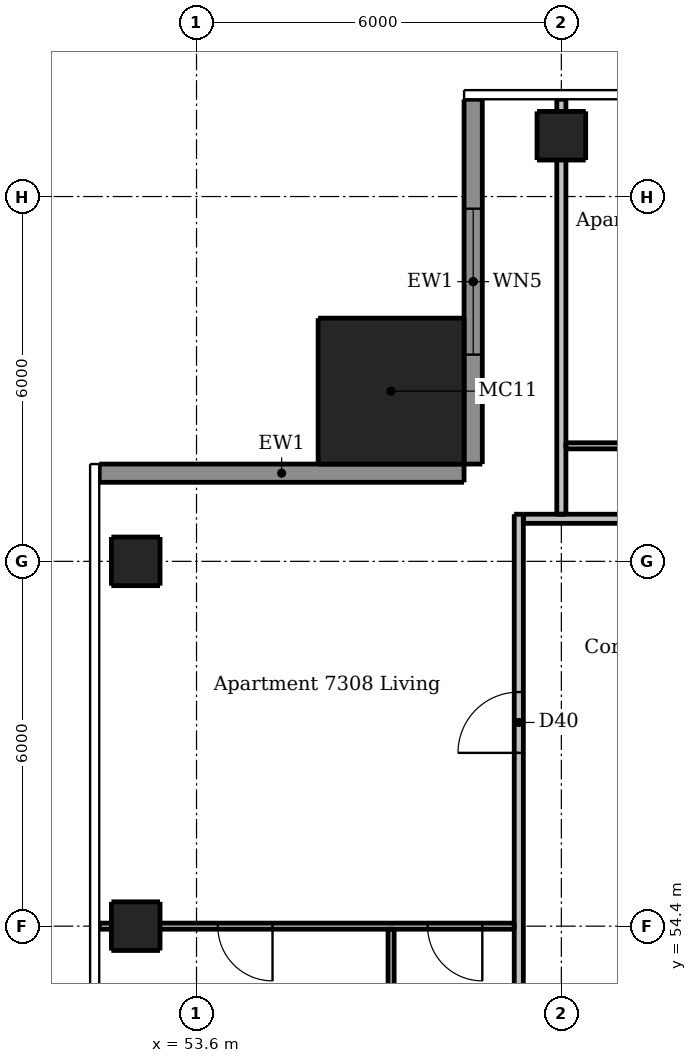
"""IFC4 building model, lengths in metres.
Left out: names, types, materials, properties, quantities, classifications, styles, units other than length and angle.
Written with IfcOpenShell. Run it as: python <this file> out.ifc"""

import sys

from ifc_helpers import new_model, si_unit, direction, frame, frame_2d, origin, origin_2d, place, context, subcontext, project, spatial, rectangle, extrude, element, fill, save


model = new_model("IFC4")
c1 = context("Model", 3, precision=1e-05, world=origin(), true_north=direction((0.0, 1.0)))
c2 = subcontext(c1, "Body", "Model", "MODEL_VIEW")
j1 = project(units=[si_unit("LENGTHUNIT", "METRE"), si_unit("PLANEANGLEUNIT", "RADIAN")], contexts=[c1])
p1 = place(None, origin())
s1 = spatial("IfcSite", under=j1, at=p1, CompositionType="ELEMENT")
p2 = place(p1, origin())
s2 = spatial("IfcBuilding", under=s1, at=p2, CompositionType="ELEMENT")
p3 = place(p2, frame((0.0, 0.0, 271.9)))
s3 = spatial("IfcBuildingStorey", under=s2, at=p3, CompositionType="ELEMENT", Elevation=271.9)
for number, where, z_axis, x_axis in (
    (1, (59.6, 67.4, 0.0), (0.0, 0.0, 1.0), (1.0, 0.0, 0.0)),
    (2, (52.6, 54.4, 0.0), (0.0, 0.0, 1.0), (1.0, 0.0, 0.0)),
    (3, (52.6, 60.4, 0.0), (0.0, 0.0, 1.0), (1.0, 0.0, 0.0)),
):
    element("IfcColumn", number, at=place(p3, frame(where, z_axis=z_axis, x_axis=x_axis)), inside=s3, PredefinedType="COLUMN", context=c2, shape_type="SweptSolid", body=[
        extrude(rectangle(XDim=0.8, YDim=0.8, at=origin_2d()), origin(), (0.0, 0.0, 1.0), 3.05),
    ])
p4 = place(p3, frame((56.8, 63.2, 0.0), z_axis=(0.0, 0.0, 1.0), x_axis=(1.0, 0.0, 0.0)))
e4 = element("IfcColumn", 4, at=p4, inside=s3, PredefinedType="COLUMN", context=c2, shape_type="SweptSolid", body=[
    extrude(rectangle(XDim=2.4, YDim=2.4, at=origin_2d()), origin(), (0.0, 0.0, 1.0), 3.3),
])
p5 = place(p3, frame((58.15, 68.0, 0.0), z_axis=(0.0, 0.0, 1.0), x_axis=(0.0, -1.0, 0.0)))
e5 = element("IfcWall", 5, at=p5, inside=s3, PredefinedType="SOLIDWALL", context=c2, shape_type="SweptSolid", body=[
    extrude(rectangle(XDim=6.0, YDim=0.3, at=frame_2d((3.0, 0.0))), origin(), (0.0, 0.0, 1.0), 3.05),
])
p6 = place(p5, frame((1.8, 0.0, 0.15)))
e6 = element("IfcOpeningElement", 6, at=p6, cuts=e5, PredefinedType="OPENING", context=c2, shape_type="SweptSolid", body=[
    extrude(rectangle(XDim=2.4, YDim=2.1, at=frame_2d((1.2, 1.05))), frame((0.0, 0.16, 0.0), z_axis=(0.0, -1.0, 0.0), x_axis=(1.0, 0.0, 0.0)), (0.0, 0.0, 1.0), 0.32),
])
p7 = place(p3, frame((58.0, 61.85, 0.0), z_axis=(0.0, 0.0, 1.0), x_axis=(-1.0, 0.0, 0.0)))
e7 = element("IfcWall", 7, at=p7, inside=s3, PredefinedType="SOLIDWALL", context=c2, shape_type="SweptSolid", body=[
    extrude(rectangle(XDim=6.0, YDim=0.3, at=frame_2d((3.0, 0.0))), origin(), (0.0, 0.0, 1.0), 3.05),
])
p8 = place(p3, frame((56.8, 54.35, 0.0), z_axis=(0.0, 0.0, 1.0), x_axis=(0.0, -1.0, 0.0)))
e8 = element("IfcWall", 8, at=p8, inside=s3, PredefinedType="PARTITIONING", context=c2, shape_type="SweptSolid", body=[
    extrude(rectangle(XDim=5.875, YDim=0.1, at=frame_2d((2.938, 0.0))), origin(), (0.0, 0.0, 1.0), 3.05),
])
p9 = place(p8, frame((3.75, 0.0, 0.0)))
e9 = element("IfcOpeningElement", 9, at=p9, cuts=e8, PredefinedType="OPENING", context=c2, shape_type="SweptSolid", body=[
    extrude(rectangle(XDim=0.8, YDim=2.1, at=frame_2d((0.4, 1.05))), frame((0.0, 0.06, 0.0), z_axis=(0.0, -1.0, 0.0), x_axis=(1.0, 0.0, 0.0)), (0.0, 0.0, 1.0), 0.12),
])
p10 = place(p3, frame((59.675, 62.3, 0.0), z_axis=(0.0, 0.0, 1.0), x_axis=(1.0, 0.0, 0.0)))
e10 = element("IfcWall", 10, at=p10, inside=s3, PredefinedType="PARTITIONING", context=c2, shape_type="SweptSolid", body=[
    extrude(rectangle(XDim=17.85, YDim=0.1, at=frame_2d((8.925, 0.0))), origin(), (0.0, 0.0, 1.0), 3.05),
])
p11 = place(p10, frame((9.975, 0.0, 0.0)))
e11 = element("IfcOpeningElement", 11, at=p11, cuts=e10, PredefinedType="OPENING", context=c2, shape_type="SweptSolid", body=[
    extrude(rectangle(XDim=0.9, YDim=2.1, at=frame_2d((0.45, 1.05))), frame((0.0, 0.06, 0.0), z_axis=(0.0, -1.0, 0.0), x_axis=(1.0, 0.0, 0.0)), (0.0, 0.0, 1.0), 0.12),
])
p12 = place(p10, frame((15.975, 0.0, 0.0)))
e12 = element("IfcOpeningElement", 12, at=p12, cuts=e10, PredefinedType="OPENING", context=c2, shape_type="SweptSolid", body=[
    extrude(rectangle(XDim=0.9, YDim=2.1, at=frame_2d((0.45, 1.05))), frame((0.0, 0.06, 0.0), z_axis=(0.0, -1.0, 0.0), x_axis=(1.0, 0.0, 0.0)), (0.0, 0.0, 1.0), 0.12),
])
p13 = place(p10, frame((13.575, 0.0, 0.0)))
e13 = element("IfcOpeningElement", 13, at=p13, cuts=e10, PredefinedType="OPENING", context=c2, shape_type="SweptSolid", body=[
    extrude(rectangle(XDim=0.9, YDim=2.1, at=frame_2d((0.45, 1.05))), frame((0.0, 0.06, 0.0), z_axis=(0.0, -1.0, 0.0), x_axis=(1.0, 0.0, 0.0)), (0.0, 0.0, 1.0), 0.12),
])
p14 = place(p10, frame((6.375, 0.0, 0.0)))
e14 = element("IfcOpeningElement", 14, at=p14, cuts=e10, PredefinedType="OPENING", context=c2, shape_type="SweptSolid", body=[
    extrude(rectangle(XDim=0.9, YDim=2.1, at=frame_2d((0.45, 1.05))), frame((0.0, 0.06, 0.0), z_axis=(0.0, -1.0, 0.0), x_axis=(1.0, 0.0, 0.0)), (0.0, 0.0, 1.0), 0.12),
])
p15 = place(p10, frame((1.275, 0.0, 0.0)))
e15 = element("IfcOpeningElement", 15, at=p15, cuts=e10, PredefinedType="OPENING", context=c2, shape_type="SweptSolid", body=[
    extrude(rectangle(XDim=0.9, YDim=2.1, at=frame_2d((0.45, 1.05))), frame((0.0, 0.06, 0.0), z_axis=(0.0, -1.0, 0.0), x_axis=(1.0, 0.0, 0.0)), (0.0, 0.0, 1.0), 0.12),
])
p16 = place(p10, frame((4.325, 0.0, 0.0)))
e16 = element("IfcOpeningElement", 16, at=p16, cuts=e10, PredefinedType="OPENING", context=c2, shape_type="SweptSolid", body=[
    extrude(rectangle(XDim=0.8, YDim=2.1, at=frame_2d((0.4, 1.05))), frame((0.0, 0.06, 0.0), z_axis=(0.0, -1.0, 0.0), x_axis=(1.0, 0.0, 0.0)), (0.0, 0.0, 1.0), 0.12),
])
p17 = place(p3, frame((58.825, 54.4, 0.0), z_axis=(0.0, 0.0, 1.0), x_axis=(-1.0, 0.0, 0.0)))
e17 = element("IfcWall", 17, at=p17, inside=s3, PredefinedType="PARTITIONING", context=c2, shape_type="SweptSolid", body=[
    extrude(rectangle(XDim=6.825, YDim=0.1, at=frame_2d((3.413, 0.0))), origin(), (0.0, 0.0, 1.0), 2.516),
])
p18 = place(p17, frame((0.525, 0.0, 0.0)))
e18 = element("IfcOpeningElement", 18, at=p18, cuts=e17, PredefinedType="OPENING", context=c2, shape_type="SweptSolid", body=[
    extrude(rectangle(XDim=0.9, YDim=2.1, at=frame_2d((0.45, 1.05))), frame((0.0, 0.06, 0.0), z_axis=(0.0, -1.0, 0.0), x_axis=(1.0, 0.0, 0.0)), (0.0, 0.0, 1.0), 0.12),
])
p19 = place(p17, frame((3.975, 0.0, 0.0)))
e19 = element("IfcOpeningElement", 19, at=p19, cuts=e17, PredefinedType="OPENING", context=c2, shape_type="SweptSolid", body=[
    extrude(rectangle(XDim=0.9, YDim=2.1, at=frame_2d((0.45, 1.05))), frame((0.0, 0.06, 0.0), z_axis=(0.0, -1.0, 0.0), x_axis=(1.0, 0.0, 0.0)), (0.0, 0.0, 1.0), 0.12),
])
p20 = place(p3, frame((58.9, 30.325, 0.0), z_axis=(0.0, 0.0, 1.0), x_axis=(0.0, 1.0, 0.0)))
e20 = element("IfcWall", 20, at=p20, inside=s3, PredefinedType="PARTITIONING", context=c2, shape_type="SweptSolid", body=[
    extrude(rectangle(XDim=30.85, YDim=0.15, at=frame_2d((15.425, 0.0))), origin(), (0.0, 0.0, 1.0), 3.05),
])
p21 = place(p20, frame((9.225, 0.0, 0.0)))
e21 = element("IfcOpeningElement", 21, at=p21, cuts=e20, PredefinedType="OPENING", context=c2, shape_type="SweptSolid", body=[
    extrude(rectangle(XDim=1.0, YDim=2.1, at=frame_2d((0.5, 1.05))), frame((0.0, 0.085, 0.0), z_axis=(0.0, -1.0, 0.0), x_axis=(1.0, 0.0, 0.0)), (0.0, 0.0, 1.0), 0.17),
])
p22 = place(p20, frame((26.925, 0.0, 0.0)))
e22 = element("IfcOpeningElement", 22, at=p22, cuts=e20, PredefinedType="OPENING", context=c2, shape_type="SweptSolid", body=[
    extrude(rectangle(XDim=1.0, YDim=2.1, at=frame_2d((0.5, 1.05))), frame((0.0, 0.085, 0.0), z_axis=(0.0, -1.0, 0.0), x_axis=(1.0, 0.0, 0.0)), (0.0, 0.0, 1.0), 0.17),
])
p23 = place(p3, frame((59.6, 61.175, 0.0), z_axis=(0.0, 0.0, 1.0), x_axis=(0.0, 1.0, 0.0)))
e23 = element("IfcWall", 23, at=p23, inside=s3, PredefinedType="PARTITIONING", context=c2, shape_type="SweptSolid", body=[
    extrude(rectangle(XDim=6.825, YDim=0.15, at=frame_2d((3.413, 0.0))), origin(), (0.0, 0.0, 1.0), 2.51),
])
p24 = place(p3, frame((58.975, 61.1, 0.0), z_axis=(0.0, 0.0, 1.0), x_axis=(1.0, 0.0, 0.0)))
e24 = element("IfcWall", 24, at=p24, inside=s3, PredefinedType="PARTITIONING", context=c2, shape_type="SweptSolid", body=[
    extrude(rectangle(XDim=29.25, YDim=0.15, at=frame_2d((14.625, 0.0))), origin(), (0.0, 0.0, 1.0), 3.05),
])
p25 = place(p24, frame((9.125, 0.0, 0.0)))
e25 = element("IfcOpeningElement", 25, at=p25, cuts=e24, PredefinedType="OPENING", context=c2, shape_type="SweptSolid", body=[
    extrude(rectangle(XDim=1.0, YDim=2.1, at=frame_2d((0.5, 1.05))), frame((0.0, 0.085, 0.0), z_axis=(0.0, -1.0, 0.0), x_axis=(1.0, 0.0, 0.0)), (0.0, 0.0, 1.0), 0.17),
])
p26 = place(p24, frame((26.475, 0.0, 0.0)))
e26 = element("IfcOpeningElement", 26, at=p26, cuts=e24, PredefinedType="OPENING", context=c2, shape_type="SweptSolid", body=[
    extrude(rectangle(XDim=1.0, YDim=2.1, at=frame_2d((0.5, 1.05))), frame((0.0, 0.085, 0.0), z_axis=(0.0, -1.0, 0.0), x_axis=(1.0, 0.0, 0.0)), (0.0, 0.0, 1.0), 0.17),
])
p27 = place(p6, origin())
e27 = element("IfcWindow", 27, at=p27, inside=s3, PartitioningType="DOUBLE_PANEL_VERTICAL", PredefinedType="WINDOW", context=c2, shape_type="SweptSolid", body=[
    extrude(rectangle(XDim=2.4, YDim=2.1, at=frame_2d((1.2, 1.05))), frame((0.0, 0.03, 0.0), z_axis=(0.0, -1.0, 0.0), x_axis=(1.0, 0.0, 0.0)), (0.0, 0.0, 1.0), 0.06),
])
fill(e6, e27)
p28 = place(p22, origin())
e28 = element("IfcDoor", 28, at=p28, inside=s3, OperationType="SINGLE_SWING_LEFT", PredefinedType="DOOR", context=c2, shape_type="SweptSolid", body=[
    extrude(rectangle(XDim=1.0, YDim=2.1, at=frame_2d((0.5, 1.05))), frame((0.0, 0.025, 0.0), z_axis=(0.0, -1.0, 0.0), x_axis=(1.0, 0.0, 0.0)), (0.0, 0.0, 1.0), 0.05),
])
fill(e22, e28)
p29 = place(p18, origin())
e29 = element("IfcDoor", 29, at=p29, inside=s3, OperationType="SINGLE_SWING_LEFT", PredefinedType="DOOR", context=c2, shape_type="SweptSolid", body=[
    extrude(rectangle(XDim=0.9, YDim=2.1, at=frame_2d((0.45, 1.05))), frame((0.0, 0.025, 0.0), z_axis=(0.0, -1.0, 0.0), x_axis=(1.0, 0.0, 0.0)), (0.0, 0.0, 1.0), 0.05),
])
fill(e18, e29)
p30 = place(p19, origin())
e30 = element("IfcDoor", 30, at=p30, inside=s3, OperationType="SINGLE_SWING_LEFT", PredefinedType="DOOR", context=c2, shape_type="SweptSolid", body=[
    extrude(rectangle(XDim=0.9, YDim=2.1, at=frame_2d((0.45, 1.05))), frame((0.0, 0.025, 0.0), z_axis=(0.0, -1.0, 0.0), x_axis=(1.0, 0.0, 0.0)), (0.0, 0.0, 1.0), 0.05),
])
fill(e19, e30)
save(model, sys.argv[1])
